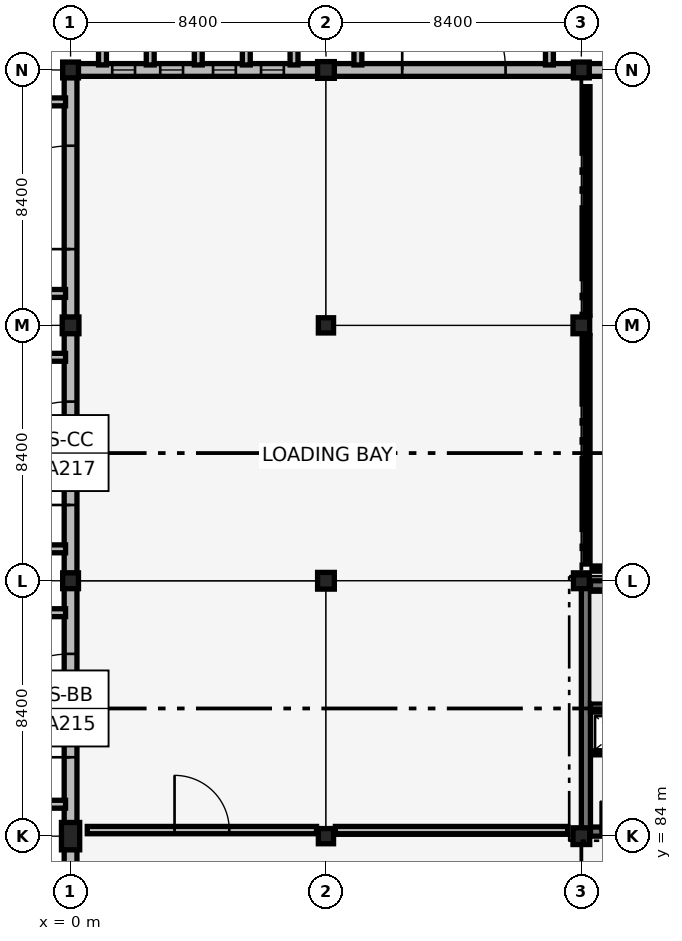
"""IFC4 building model, lengths in metres.
Left out: names, types, materials, properties, quantities, classifications, styles, units other than length and angle.
Written with IfcOpenShell. Run it as: python <this file> out.ifc"""

import sys

from ifc_helpers import new_model, si_unit, direction, frame, frame_2d, origin, origin_2d, place, context, subcontext, project, spatial, rectangle, extrude, element, fill, save


model = new_model("IFC4")
c1 = context("Model", 3, precision=1e-05, world=origin(), true_north=direction((0.0, 1.0)))
c2 = subcontext(c1, "Body", "Model", "MODEL_VIEW")
j1 = project(units=[si_unit("LENGTHUNIT", "METRE"), si_unit("PLANEANGLEUNIT", "RADIAN")], contexts=[c1])
p1 = place(None, origin())
s1 = spatial("IfcSite", under=j1, at=p1, CompositionType="ELEMENT")
p2 = place(p1, origin())
s2 = spatial("IfcBuilding", under=s1, at=p2, CompositionType="ELEMENT")
p3 = place(p2, origin())
s3 = spatial("IfcBuildingStorey", under=s2, at=p3, CompositionType="ELEMENT", Elevation=0.0)
p4 = place(p3, frame((16.95, 84.15, 0.0), z_axis=(0.0, 0.0, 1.0), x_axis=(1.0, 0.0, 0.0)))
e1 = element("IfcWall", 1, at=p4, inside=s3, PredefinedType="SHEAR", context=c2, shape_type="SweptSolid", body=[
    extrude(rectangle(XDim=8.1, YDim=0.3, at=frame_2d((4.05, 0.0))), origin(), (0.0, 0.0, 1.0), 5.14),
])
p5 = place(p4, frame((0.485, 0.0, 0.0)))
e2 = element("IfcOpeningElement", 2, at=p5, cuts=e1, PredefinedType="OPENING", context=c2, shape_type="SweptSolid", body=[
    extrude(rectangle(XDim=1.0, YDim=2.15, at=frame_2d((0.5, 1.075))), frame((0.0, 0.16, 0.0), z_axis=(0.0, -1.0, 0.0), x_axis=(1.0, 0.0, 0.0)), (0.0, 0.0, 1.0), 0.32),
])
for number, where, z_axis, x_axis in (
    (3, (16.95, 92.25, 0.0), (0.0, 0.0, 1.0), (1.0, 0.0, 0.0)),
    (4, (16.95, 84.15, 0.0), (0.0, 0.0, 1.0), (0.0, 1.0, 0.0)),
):
    element("IfcWall", number, at=place(p3, frame(where, z_axis=z_axis, x_axis=x_axis)), inside=s3, PredefinedType="SHEAR", context=c2, shape_type="SweptSolid", body=[
        extrude(rectangle(XDim=8.1, YDim=0.3, at=frame_2d((4.05, 0.0))), origin(), (0.0, 0.0, 1.0), 5.14),
    ])
p6 = place(p3, frame((17.1, 88.23, 0.0), z_axis=(0.0, 0.0, 1.0), x_axis=(1.0, 0.0, 0.0)))
e5 = element("IfcWall", 5, at=p6, inside=s3, PredefinedType="SHEAR", context=c2, shape_type="SweptSolid", body=[
    extrude(rectangle(XDim=7.8, YDim=0.3, at=frame_2d((3.9, 0.0))), origin(), (0.0, 0.0, 1.0), 5.14),
])
p7 = place(p6, frame((6.2, 0.0, 0.0)))
e6 = element("IfcOpeningElement", 6, at=p7, cuts=e5, PredefinedType="OPENING", context=c2, shape_type="SweptSolid", body=[
    extrude(rectangle(XDim=1.35, YDim=2.15, at=frame_2d((0.675, 1.075))), frame((0.0, 0.16, 0.0), z_axis=(0.0, -1.0, 0.0), x_axis=(1.0, 0.0, 0.0)), (0.0, 0.0, 1.0), 0.32),
])
p8 = place(p3, frame((0.0, 84.0, 0.0), z_axis=(0.0, 0.0, 1.0), x_axis=(1.0, 0.0, 0.0)))
e7 = element("IfcColumn", 7, at=p8, inside=s3, PredefinedType="COLUMN", context=c2, shape_type="SweptSolid", body=[
    extrude(rectangle(XDim=0.6, YDim=0.9, at=origin_2d()), origin(), (0.0, 0.0, 1.0), 5.14),
])
p9 = place(p3, frame((0.0, 92.4, 0.0), z_axis=(0.0, 0.0, 1.0), x_axis=(1.0, 0.0, 0.0)))
e8 = element("IfcColumn", 8, at=p9, inside=s3, PredefinedType="COLUMN", context=c2, shape_type="SweptSolid", body=[
    extrude(rectangle(XDim=0.52, YDim=0.52, at=origin_2d()), origin(), (0.0, 0.0, 1.0), 5.14),
])
p10 = place(p3, frame((0.0, 100.8, 0.0), z_axis=(0.0, 0.0, 1.0), x_axis=(1.0, 0.0, 0.0)))
e9 = element("IfcColumn", 9, at=p10, inside=s3, PredefinedType="COLUMN", context=c2, shape_type="SweptSolid", body=[
    extrude(rectangle(XDim=0.55, YDim=0.55, at=origin_2d()), origin(), (0.0, 0.0, 1.0), 5.14),
])
p11 = place(p3, frame((0.0, 109.2, 0.0), z_axis=(0.0, 0.0, 1.0), x_axis=(1.0, 0.0, 0.0)))
e10 = element("IfcColumn", 10, at=p11, inside=s3, PredefinedType="COLUMN", context=c2, shape_type="SweptSolid", body=[
    extrude(rectangle(XDim=0.52, YDim=0.52, at=origin_2d()), origin(), (0.0, 0.0, 1.0), 5.14),
])
p12 = place(p3, frame((8.4, 84.0, 0.0), z_axis=(0.0, 0.0, 1.0), x_axis=(1.0, 0.0, 0.0)))
e11 = element("IfcColumn", 11, at=p12, inside=s3, PredefinedType="COLUMN", context=c2, shape_type="SweptSolid", body=[
    extrude(rectangle(XDim=0.5, YDim=0.5, at=origin_2d()), origin(), (0.0, 0.0, 1.0), 5.14),
])
p13 = place(p3, frame((8.4, 92.4, 0.0), z_axis=(0.0, 0.0, 1.0), x_axis=(1.0, 0.0, 0.0)))
e12 = element("IfcColumn", 12, at=p13, inside=s3, PredefinedType="COLUMN", context=c2, shape_type="SweptSolid", body=[
    extrude(rectangle(XDim=0.55, YDim=0.55, at=origin_2d()), origin(), (0.0, 0.0, 1.0), 5.14),
])
p14 = place(p3, frame((8.4, 100.8, 0.0), z_axis=(0.0, 0.0, 1.0), x_axis=(1.0, 0.0, 0.0)))
e13 = element("IfcColumn", 13, at=p14, inside=s3, PredefinedType="COLUMN", context=c2, shape_type="SweptSolid", body=[
    extrude(rectangle(XDim=0.5, YDim=0.5, at=origin_2d()), origin(), (0.0, 0.0, 1.0), 5.14),
])
for number, where, z_axis, x_axis in (
    (14, (8.4, 109.2, 0.0), (0.0, 0.0, 1.0), (1.0, 0.0, 0.0)),
    (15, (16.8, 84.0, 0.0), (0.0, 0.0, 1.0), (1.0, 0.0, 0.0)),
):
    element("IfcColumn", number, at=place(p3, frame(where, z_axis=z_axis, x_axis=x_axis)), inside=s3, PredefinedType="COLUMN", context=c2, shape_type="SweptSolid", body=[
        extrude(rectangle(XDim=0.55, YDim=0.55, at=origin_2d()), origin(), (0.0, 0.0, 1.0), 5.14),
    ])
p15 = place(p3, frame((16.8, 92.4, 0.0), z_axis=(0.0, 0.0, 1.0), x_axis=(1.0, 0.0, 0.0)))
e16 = element("IfcColumn", 16, at=p15, inside=s3, PredefinedType="COLUMN", context=c2, shape_type="SweptSolid", body=[
    extrude(rectangle(XDim=0.52, YDim=0.52, at=origin_2d()), origin(), (0.0, 0.0, 1.0), 5.14),
])
p16 = place(p3, frame((16.8, 100.8, 0.0), z_axis=(0.0, 0.0, 1.0), x_axis=(1.0, 0.0, 0.0)))
e17 = element("IfcColumn", 17, at=p16, inside=s3, PredefinedType="COLUMN", context=c2, shape_type="SweptSolid", body=[
    extrude(rectangle(XDim=0.55, YDim=0.55, at=origin_2d()), origin(), (0.0, 0.0, 1.0), 5.14),
])
p17 = place(p3, frame((16.8, 109.2, 0.0), z_axis=(0.0, 0.0, 1.0), x_axis=(1.0, 0.0, 0.0)))
e18 = element("IfcColumn", 18, at=p17, inside=s3, PredefinedType="COLUMN", context=c2, shape_type="SweptSolid", body=[
    extrude(rectangle(XDim=0.52, YDim=0.52, at=origin_2d()), origin(), (0.0, 0.0, 1.0), 5.14),
])
p18 = place(p3, frame((0.0, 76.035, 0.0), z_axis=(0.0, 0.0, 1.0), x_axis=(0.0, 1.0, 0.0)))
e19 = element("IfcWall", 19, at=p18, inside=s3, PredefinedType="SOLIDWALL", context=c2, shape_type="SweptSolid", body=[
    extrude(rectangle(XDim=7.53, YDim=0.42, at=frame_2d((3.765, 0.0))), origin(), (0.0, 0.0, 1.0), 5.04),
])
p19 = place(p3, frame((0.0, 84.435, 0.0), z_axis=(0.0, 0.0, 1.0), x_axis=(0.0, 1.0, 0.0)))
e20 = element("IfcWall", 20, at=p19, inside=s3, PredefinedType="SOLIDWALL", context=c2, shape_type="SweptSolid", body=[
    extrude(rectangle(XDim=7.72, YDim=0.42, at=frame_2d((3.86, 0.0))), origin(), (0.0, 0.0, 1.0), 4.35),
])
p20 = place(p19, frame((2.16, 0.0, 0.0)))
e21 = element("IfcOpeningElement", 21, at=p20, cuts=e20, PredefinedType="OPENING", context=c2, shape_type="SweptSolid", body=[
    extrude(rectangle(XDim=3.4, YDim=3.8, at=frame_2d((1.7, 1.9))), frame((0.0, 0.22, 0.0), z_axis=(0.0, -1.0, 0.0), x_axis=(1.0, 0.0, 0.0)), (0.0, 0.0, 1.0), 0.44),
])
for number, where, z_axis, x_axis in (
    (22, (-0.165, 85.05, -0.25), (0.0, 0.0, 1.0), (-1.0, 0.0, 0.0)),
    (23, (-0.165, 91.35, -0.25), (0.0, 0.0, 1.0), (-1.0, 0.0, 0.0)),
):
    element("IfcWall", number, at=place(p3, frame(where, z_axis=z_axis, x_axis=x_axis)), inside=s3, PredefinedType="SOLIDWALL", context=c2, shape_type="SweptSolid", body=[
        extrude(rectangle(XDim=0.7, YDim=0.26, at=frame_2d((0.35, 0.0))), origin(), (0.0, 0.0, 1.0), 5.69),
    ])
p21 = place(p3, frame((0.0, 92.645, 0.0), z_axis=(0.0, 0.0, 1.0), x_axis=(0.0, 1.0, 0.0)))
e24 = element("IfcWall", 24, at=p21, inside=s3, PredefinedType="SOLIDWALL", context=c2, shape_type="SweptSolid", body=[
    extrude(rectangle(XDim=7.895, YDim=0.42, at=frame_2d((3.948, 0.0))), origin(), (0.0, 0.0, 1.0), 4.35),
])
p22 = place(p21, frame((2.248, 0.0, 0.0)))
e25 = element("IfcOpeningElement", 25, at=p22, cuts=e24, PredefinedType="OPENING", context=c2, shape_type="SweptSolid", body=[
    extrude(rectangle(XDim=3.4, YDim=3.8, at=frame_2d((1.7, 1.9))), frame((0.0, 0.22, 0.0), z_axis=(0.0, -1.0, 0.0), x_axis=(1.0, 0.0, 0.0)), (0.0, 0.0, 1.0), 0.44),
])
for number, where, z_axis, x_axis in (
    (26, (-0.165, 93.45, -0.25), (0.0, 0.0, 1.0), (-1.0, 0.0, 0.0)),
    (27, (-0.165, 99.75, -0.25), (0.0, 0.0, 1.0), (-1.0, 0.0, 0.0)),
):
    element("IfcWall", number, at=place(p3, frame(where, z_axis=z_axis, x_axis=x_axis)), inside=s3, PredefinedType="SOLIDWALL", context=c2, shape_type="SweptSolid", body=[
        extrude(rectangle(XDim=0.7, YDim=0.26, at=frame_2d((0.35, 0.0))), origin(), (0.0, 0.0, 1.0), 5.69),
    ])
p23 = place(p3, frame((0.245, 109.2, 0.0), z_axis=(0.0, 0.0, 1.0), x_axis=(1.0, 0.0, 0.0)))
e28 = element("IfcWall", 28, at=p23, inside=s3, PredefinedType="SOLIDWALL", context=c2, shape_type="SweptSolid", body=[
    extrude(rectangle(XDim=7.895, YDim=0.42, at=frame_2d((3.947, 0.0))), origin(), (0.0, 0.0, 1.0), 4.35),
])
p24 = place(p23, frame((1.125, 0.0, 0.75)))
e29 = element("IfcOpeningElement", 29, at=p24, cuts=e28, PredefinedType="OPENING", context=c2, shape_type="SweptSolid", body=[
    extrude(rectangle(XDim=0.75, YDim=2.1, at=frame_2d((0.375, 1.05))), frame((0.0, 0.22, 0.0), z_axis=(0.0, -1.0, 0.0), x_axis=(1.0, 0.0, 0.0)), (0.0, 0.0, 1.0), 0.44),
])
p25 = place(p23, frame((2.704, 0.0, 0.75)))
e30 = element("IfcOpeningElement", 30, at=p25, cuts=e28, PredefinedType="OPENING", context=c2, shape_type="SweptSolid", body=[
    extrude(rectangle(XDim=0.75, YDim=2.1, at=frame_2d((0.375, 1.05))), frame((0.0, 0.22, 0.0), z_axis=(0.0, -1.0, 0.0), x_axis=(1.0, 0.0, 0.0)), (0.0, 0.0, 1.0), 0.44),
])
p26 = place(p23, frame((4.441, 0.0, 0.75)))
e31 = element("IfcOpeningElement", 31, at=p26, cuts=e28, PredefinedType="OPENING", context=c2, shape_type="SweptSolid", body=[
    extrude(rectangle(XDim=0.75, YDim=2.1, at=frame_2d((0.375, 1.05))), frame((0.0, 0.22, 0.0), z_axis=(0.0, -1.0, 0.0), x_axis=(1.0, 0.0, 0.0)), (0.0, 0.0, 1.0), 0.44),
])
p27 = place(p23, frame((6.02, 0.0, 0.75)))
e32 = element("IfcOpeningElement", 32, at=p27, cuts=e28, PredefinedType="OPENING", context=c2, shape_type="SweptSolid", body=[
    extrude(rectangle(XDim=0.75, YDim=2.1, at=frame_2d((0.375, 1.05))), frame((0.0, 0.22, 0.0), z_axis=(0.0, -1.0, 0.0), x_axis=(1.0, 0.0, 0.0)), (0.0, 0.0, 1.0), 0.44),
])
for number, where, z_axis, x_axis in (
    (33, (1.05, 109.365, -0.25), (0.0, 0.0, 1.0), (0.0, 1.0, 0.0)),
    (34, (2.62, 109.365, -0.25), (0.0, 0.0, 1.0), (0.0, 1.0, 0.0)),
    (35, (4.2, 109.365, -0.25), (0.0, 0.0, 1.0), (0.0, 1.0, 0.0)),
    (36, (5.78, 109.365, -0.25), (0.0, 0.0, 1.0), (0.0, 1.0, 0.0)),
    (37, (7.35, 109.365, -0.25), (0.0, 0.0, 1.0), (0.0, 1.0, 0.0)),
):
    element("IfcWall", number, at=place(p3, frame(where, z_axis=z_axis, x_axis=x_axis)), inside=s3, PredefinedType="SOLIDWALL", context=c2, shape_type="SweptSolid", body=[
        extrude(rectangle(XDim=0.7, YDim=0.26, at=frame_2d((0.35, 0.0))), origin(), (0.0, 0.0, 1.0), 5.69),
    ])
p28 = place(p3, frame((0.0, 101.06, 0.0), z_axis=(0.0, 0.0, 1.0), x_axis=(0.0, 1.0, 0.0)))
e38 = element("IfcWall", 38, at=p28, inside=s3, PredefinedType="SOLIDWALL", context=c2, shape_type="SweptSolid", body=[
    extrude(rectangle(XDim=7.895, YDim=0.42, at=frame_2d((3.948, 0.0))), origin(), (0.0, 0.0, 1.0), 4.35),
])
p29 = place(p28, frame((2.248, 0.0, 0.0)))
e39 = element("IfcOpeningElement", 39, at=p29, cuts=e38, PredefinedType="OPENING", context=c2, shape_type="SweptSolid", body=[
    extrude(rectangle(XDim=3.4, YDim=3.8, at=frame_2d((1.7, 1.9))), frame((0.0, 0.22, 0.0), z_axis=(0.0, -1.0, 0.0), x_axis=(1.0, 0.0, 0.0)), (0.0, 0.0, 1.0), 0.44),
])
for number, where, z_axis, x_axis in (
    (40, (-0.165, 101.85, -0.25), (0.0, 0.0, 1.0), (-1.0, 0.0, 0.0)),
    (41, (-0.165, 108.15, -0.25), (0.0, 0.0, 1.0), (-1.0, 0.0, 0.0)),
):
    element("IfcWall", number, at=place(p3, frame(where, z_axis=z_axis, x_axis=x_axis)), inside=s3, PredefinedType="SOLIDWALL", context=c2, shape_type="SweptSolid", body=[
        extrude(rectangle(XDim=0.7, YDim=0.26, at=frame_2d((0.35, 0.0))), origin(), (0.0, 0.0, 1.0), 5.69),
    ])
p30 = place(p3, frame((8.66, 109.2, 0.0), z_axis=(0.0, 0.0, 1.0), x_axis=(1.0, 0.0, 0.0)))
e42 = element("IfcWall", 42, at=p30, inside=s3, PredefinedType="SOLIDWALL", context=c2, shape_type="SweptSolid", body=[
    extrude(rectangle(XDim=7.895, YDim=0.42, at=frame_2d((3.948, 0.0))), origin(), (0.0, 0.0, 1.0), 4.35),
])
p31 = place(p30, frame((2.248, 0.0, 0.0)))
e43 = element("IfcOpeningElement", 43, at=p31, cuts=e42, PredefinedType="OPENING", context=c2, shape_type="SweptSolid", body=[
    extrude(rectangle(XDim=3.4, YDim=3.8, at=frame_2d((1.7, 1.9))), frame((0.0, 0.22, 0.0), z_axis=(0.0, -1.0, 0.0), x_axis=(1.0, 0.0, 0.0)), (0.0, 0.0, 1.0), 0.44),
])
for number, where, z_axis, x_axis in (
    (44, (9.45, 109.365, -0.25), (0.0, 0.0, 1.0), (0.0, 1.0, 0.0)),
    (45, (15.75, 109.365, -0.25), (0.0, 0.0, 1.0), (0.0, 1.0, 0.0)),
):
    element("IfcWall", number, at=place(p3, frame(where, z_axis=z_axis, x_axis=x_axis)), inside=s3, PredefinedType="SOLIDWALL", context=c2, shape_type="SweptSolid", body=[
        extrude(rectangle(XDim=0.7, YDim=0.26, at=frame_2d((0.35, 0.0))), origin(), (0.0, 0.0, 1.0), 5.69),
    ])
p32 = place(p3, frame((17.045, 109.2, 0.0), z_axis=(0.0, 0.0, 1.0), x_axis=(1.0, 0.0, 0.0)))
e46 = element("IfcWall", 46, at=p32, inside=s3, PredefinedType="SOLIDWALL", context=c2, shape_type="SweptSolid", body=[
    extrude(rectangle(XDim=7.895, YDim=0.42, at=frame_2d((3.948, 0.0))), origin(), (0.0, 0.0, 1.0), 4.35),
])
p33 = place(p32, frame((2.248, 0.0, 0.0)))
e47 = element("IfcOpeningElement", 47, at=p33, cuts=e46, PredefinedType="OPENING", context=c2, shape_type="SweptSolid", body=[
    extrude(rectangle(XDim=3.4, YDim=3.8, at=frame_2d((1.7, 1.9))), frame((0.0, 0.22, 0.0), z_axis=(0.0, -1.0, 0.0), x_axis=(1.0, 0.0, 0.0)), (0.0, 0.0, 1.0), 0.44),
])
p34 = place(p3, frame((17.12, 86.74, 0.0), z_axis=(0.0, 0.0, 1.0), x_axis=(1.0, 0.0, 0.0)))
e48 = element("IfcWall", 48, at=p34, inside=s3, PredefinedType="PARTITIONING", context=c2, shape_type="SweptSolid", body=[
    extrude(rectangle(XDim=1.62, YDim=0.13, at=frame_2d((0.81, 0.0))), origin(), (0.0, 0.0, 1.0), 5.14),
])
p35 = place(p3, frame((0.55, 84.2, 0.0), z_axis=(0.0, 0.0, 1.0), x_axis=(1.0, 0.0, 0.0)))
e49 = element("IfcWall", 49, at=p35, inside=s3, PredefinedType="PARTITIONING", context=c2, shape_type="SweptSolid", body=[
    extrude(rectangle(XDim=7.54, YDim=0.24, at=frame_2d((3.77, 0.0))), origin(), (0.0, 0.0, 1.0), 4.36),
])
p36 = place(p35, frame((2.87, 0.0, 0.0)))
e50 = element("IfcOpeningElement", 50, at=p36, cuts=e49, PredefinedType="OPENING", context=c2, shape_type="SweptSolid", body=[
    extrude(rectangle(XDim=1.8, YDim=2.4, at=frame_2d((0.9, 1.2))), frame((0.0, 0.13, 0.0), z_axis=(0.0, -1.0, 0.0), x_axis=(1.0, 0.0, 0.0)), (0.0, 0.0, 1.0), 0.26),
])
p37 = place(p3, frame((8.71, 84.2, 0.0), z_axis=(0.0, 0.0, 1.0), x_axis=(1.0, 0.0, 0.0)))
e51 = element("IfcWall", 51, at=p37, inside=s3, PredefinedType="PARTITIONING", context=c2, shape_type="SweptSolid", body=[
    extrude(rectangle(XDim=7.64, YDim=0.24, at=frame_2d((3.82, 0.0))), origin(), (0.0, 0.0, 1.0), 4.36),
])
p38 = place(p3, frame((17.15, 92.8, 0.0), z_axis=(0.0, 0.0, 1.0), x_axis=(1.0, 0.0, 0.0)))
e52 = element("IfcWall", 52, at=p38, inside=s3, PredefinedType="PARTITIONING", context=c2, shape_type="SweptSolid", body=[
    extrude(rectangle(XDim=7.715, YDim=0.17, at=frame_2d((3.857, 0.0))), origin(), (0.0, 0.0, 1.0), 5.14),
])
p39 = place(p3, frame((17.0, 92.95, 0.0), z_axis=(0.0, 0.0, 1.0), x_axis=(0.0, 1.0, 0.0)))
e53 = element("IfcWall", 53, at=p39, inside=s3, PredefinedType="PARTITIONING", context=c2, shape_type="SweptSolid", body=[
    extrude(rectangle(XDim=7.515, YDim=0.17, at=frame_2d((3.758, 0.0))), origin(), (0.0, 0.0, 1.0), 4.32),
])
p40 = place(p3, frame((17.0, 101.135, 0.0), z_axis=(0.0, 0.0, 1.0), x_axis=(0.0, 1.0, 0.0)))
e54 = element("IfcWall", 54, at=p40, inside=s3, PredefinedType="PARTITIONING", context=c2, shape_type="SweptSolid", body=[
    extrude(rectangle(XDim=7.515, YDim=0.17, at=frame_2d((3.757, 0.0))), origin(), (0.0, 0.0, 1.0), 4.32),
])
p41 = place(p20, origin())
e55 = element("IfcDoor", 55, at=p41, inside=s3, OperationType="DOUBLE_DOOR_SINGLE_SWING", PredefinedType="GATE", context=c2, shape_type="SweptSolid", body=[
    extrude(rectangle(XDim=3.4, YDim=3.8, at=frame_2d((1.7, 1.9))), frame((0.0, 0.025, 0.0), z_axis=(0.0, -1.0, 0.0), x_axis=(1.0, 0.0, 0.0)), (0.0, 0.0, 1.0), 0.05),
])
fill(e21, e55)
p42 = place(p22, origin())
e56 = element("IfcDoor", 56, at=p42, inside=s3, OperationType="DOUBLE_DOOR_SINGLE_SWING", PredefinedType="GATE", context=c2, shape_type="SweptSolid", body=[
    extrude(rectangle(XDim=3.4, YDim=3.8, at=frame_2d((1.7, 1.9))), frame((0.0, 0.025, 0.0), z_axis=(0.0, -1.0, 0.0), x_axis=(1.0, 0.0, 0.0)), (0.0, 0.0, 1.0), 0.05),
])
fill(e25, e56)
p43 = place(p24, origin())
e57 = element("IfcWindow", 57, at=p43, inside=s3, PartitioningType="DOUBLE_PANEL_VERTICAL", PredefinedType="WINDOW", context=c2, shape_type="SweptSolid", body=[
    extrude(rectangle(XDim=0.75, YDim=2.1, at=frame_2d((0.375, 1.05))), frame((0.0, 0.03, 0.0), z_axis=(0.0, -1.0, 0.0), x_axis=(1.0, 0.0, 0.0)), (0.0, 0.0, 1.0), 0.06),
])
fill(e29, e57)
p44 = place(p25, origin())
e58 = element("IfcWindow", 58, at=p44, inside=s3, PartitioningType="DOUBLE_PANEL_VERTICAL", PredefinedType="WINDOW", context=c2, shape_type="SweptSolid", body=[
    extrude(rectangle(XDim=0.75, YDim=2.1, at=frame_2d((0.375, 1.05))), frame((0.0, 0.03, 0.0), z_axis=(0.0, -1.0, 0.0), x_axis=(1.0, 0.0, 0.0)), (0.0, 0.0, 1.0), 0.06),
])
fill(e30, e58)
p45 = place(p26, origin())
e59 = element("IfcWindow", 59, at=p45, inside=s3, PartitioningType="DOUBLE_PANEL_VERTICAL", PredefinedType="WINDOW", context=c2, shape_type="SweptSolid", body=[
    extrude(rectangle(XDim=0.75, YDim=2.1, at=frame_2d((0.375, 1.05))), frame((0.0, 0.03, 0.0), z_axis=(0.0, -1.0, 0.0), x_axis=(1.0, 0.0, 0.0)), (0.0, 0.0, 1.0), 0.06),
])
fill(e31, e59)
p46 = place(p27, origin())
e60 = element("IfcWindow", 60, at=p46, inside=s3, PartitioningType="DOUBLE_PANEL_VERTICAL", PredefinedType="WINDOW", context=c2, shape_type="SweptSolid", body=[
    extrude(rectangle(XDim=0.75, YDim=2.1, at=frame_2d((0.375, 1.05))), frame((0.0, 0.03, 0.0), z_axis=(0.0, -1.0, 0.0), x_axis=(1.0, 0.0, 0.0)), (0.0, 0.0, 1.0), 0.06),
])
fill(e32, e60)
p47 = place(p29, origin())
e61 = element("IfcDoor", 61, at=p47, inside=s3, OperationType="DOUBLE_DOOR_SINGLE_SWING", PredefinedType="GATE", context=c2, shape_type="SweptSolid", body=[
    extrude(rectangle(XDim=3.4, YDim=3.8, at=frame_2d((1.7, 1.9))), frame((0.0, 0.025, 0.0), z_axis=(0.0, -1.0, 0.0), x_axis=(1.0, 0.0, 0.0)), (0.0, 0.0, 1.0), 0.05),
])
fill(e39, e61)
p48 = place(p31, origin())
e62 = element("IfcDoor", 62, at=p48, inside=s3, OperationType="DOUBLE_DOOR_SINGLE_SWING", PredefinedType="GATE", context=c2, shape_type="SweptSolid", body=[
    extrude(rectangle(XDim=3.4, YDim=3.8, at=frame_2d((1.7, 1.9))), frame((0.0, 0.025, 0.0), z_axis=(0.0, -1.0, 0.0), x_axis=(1.0, 0.0, 0.0)), (0.0, 0.0, 1.0), 0.05),
])
fill(e43, e62)
p49 = place(p5, origin())
e63 = element("IfcDoor", 63, at=p49, inside=s3, OperationType="SINGLE_SWING_LEFT", PredefinedType="DOOR", context=c2, shape_type="SweptSolid", body=[
    extrude(rectangle(XDim=1.0, YDim=2.15, at=frame_2d((0.5, 1.075))), frame((0.0, 0.025, 0.0), z_axis=(0.0, -1.0, 0.0), x_axis=(1.0, 0.0, 0.0)), (0.0, 0.0, 1.0), 0.05),
])
fill(e2, e63)
p50 = place(p36, origin())
e64 = element("IfcDoor", 64, at=p50, inside=s3, OperationType="DOUBLE_DOOR_SINGLE_SWING", PredefinedType="DOOR", context=c2, shape_type="SweptSolid", body=[
    extrude(rectangle(XDim=1.8, YDim=2.4, at=frame_2d((0.9, 1.2))), frame((0.0, 0.025, 0.0), z_axis=(0.0, -1.0, 0.0), x_axis=(1.0, 0.0, 0.0)), (0.0, 0.0, 1.0), 0.05),
])
fill(e50, e64)
save(model, sys.argv[1])
